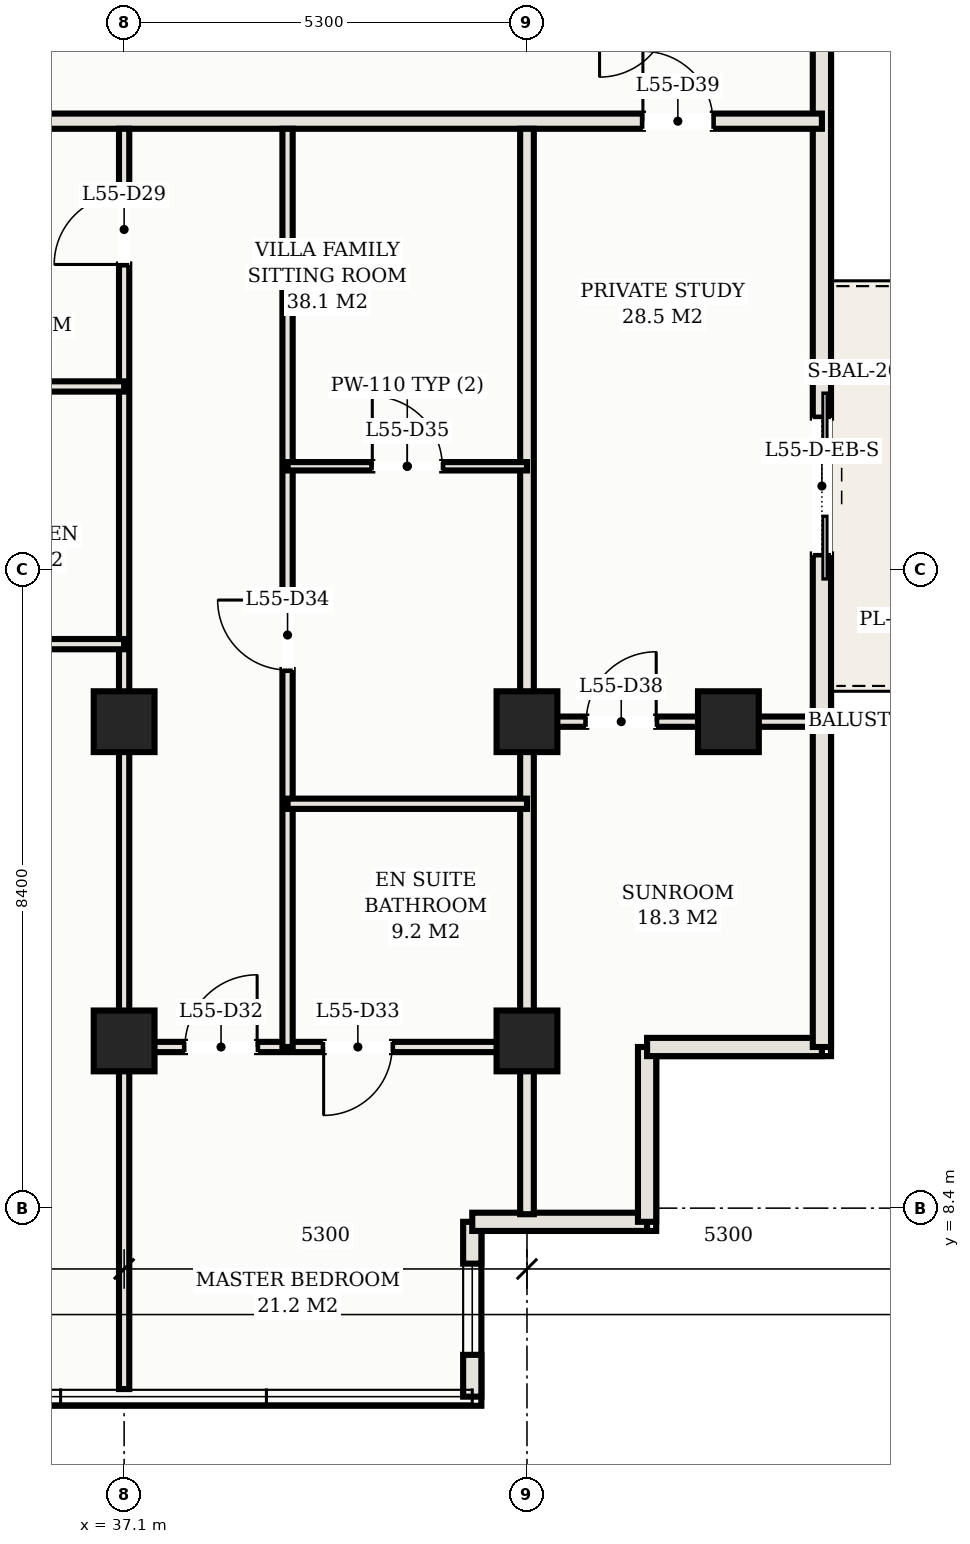
"""IFC4 building model, lengths in metres.
Left out: names, types, materials, properties, quantities, classifications, styles, units other than length and angle.
Written with IfcOpenShell. Run it as: python <this file> out.ifc"""

import sys

from ifc_helpers import new_model, si_unit, direction, frame, frame_2d, origin, origin_2d, place, context, subcontext, project, spatial, rectangle, hollow_rectangle, extrude, element, fill, save


model = new_model("IFC4")
c1 = context("Model", 3, precision=1e-05, world=origin(), true_north=direction((0.0, 1.0)))
c2 = subcontext(c1, "Body", "Model", "MODEL_VIEW")
j1 = project(units=[si_unit("LENGTHUNIT", "METRE"), si_unit("PLANEANGLEUNIT", "RADIAN")], contexts=[c1])
p1 = place(None, origin())
s1 = spatial("IfcSite", under=j1, at=p1, CompositionType="ELEMENT")
p2 = place(p1, origin())
s2 = spatial("IfcBuilding", under=s1, at=p2, CompositionType="ELEMENT")
p3 = place(p2, frame((0.0, 0.0, 203.3)))
s3 = spatial("IfcBuildingStorey", under=s2, at=p3, CompositionType="ELEMENT", Elevation=203.3)
for number, where, z_axis, x_axis in (
    (1, (37.1, 14.8, 0.0), (0.0, 0.0, 1.0), (1.0, 0.0, 0.0)),
    (2, (37.1, 10.6, 0.0), (0.0, 0.0, 1.0), (1.0, 0.0, 0.0)),
    (3, (42.4, 14.8, 0.0), (0.0, 0.0, 1.0), (1.0, 0.0, 0.0)),
    (4, (42.4, 10.6, 0.0), (0.0, 0.0, 1.0), (1.0, 0.0, 0.0)),
    (5, (45.05, 14.8, 0.0), (0.0, 0.0, 1.0), (1.0, 0.0, 0.0)),
):
    element("IfcColumn", number, at=place(p3, frame(where, z_axis=z_axis, x_axis=x_axis)), inside=s3, PredefinedType="COLUMN", context=c2, shape_type="SweptSolid", body=[
        extrude(hollow_rectangle(XDim=0.8, YDim=0.8, WallThickness=0.028, at=origin_2d()), origin(), (0.0, 0.0, 1.0), 3.3),
    ])
p4 = place(p3, frame((41.68, 5.92, 0.0), z_axis=(0.0, 0.0, 1.0), x_axis=(0.0, 1.0, 0.0)))
e6 = element("IfcWall", 6, at=p4, inside=s3, PredefinedType="SOLIDWALL", context=c2, shape_type="SweptSolid", body=[
    extrude(rectangle(XDim=2.3, YDim=0.24, at=frame_2d((1.15, 0.0))), origin(), (0.0, 0.0, 1.0), 3.11),
])
p5 = place(p4, frame((0.55, 0.0, 0.75)))
e7 = element("IfcOpeningElement", 7, at=p5, cuts=e6, PredefinedType="OPENING", context=c2, shape_type="SweptSolid", body=[
    extrude(rectangle(XDim=1.2, YDim=1.5, at=frame_2d((0.6, 0.75))), frame((0.0, 0.13, 0.0), z_axis=(0.0, -1.0, 0.0), x_axis=(1.0, 0.0, 0.0)), (0.0, 0.0, 1.0), 0.26),
])
for number, where, z_axis, x_axis in (
    (8, (41.68, 8.22, 0.0), (0.0, 0.0, 1.0), (1.0, 0.0, 0.0)),
    (9, (43.98, 8.22, 0.0), (0.0, 0.0, 1.0), (0.0, 1.0, 0.0)),
    (10, (43.98, 10.52, 0.0), (0.0, 0.0, 1.0), (1.0, 0.0, 0.0)),
):
    element("IfcWall", number, at=place(p3, frame(where, z_axis=z_axis, x_axis=x_axis)), inside=s3, PredefinedType="SOLIDWALL", context=c2, shape_type="SweptSolid", body=[
        extrude(rectangle(XDim=2.3, YDim=0.24, at=frame_2d((1.15, 0.0))), origin(), (0.0, 0.0, 1.0), 3.11),
    ])
p6 = place(p3, frame((46.28, 10.52, 0.0), z_axis=(0.0, 0.0, 1.0), x_axis=(0.0, 1.0, 0.0)))
e11 = element("IfcWall", 11, at=p6, inside=s3, PredefinedType="SOLIDWALL", context=c2, shape_type="SweptSolid", body=[
    extrude(rectangle(XDim=26.41, YDim=0.24, at=frame_2d((13.205, 0.0))), origin(), (0.0, 0.0, 1.0), 3.11),
])
p7 = place(p6, frame((6.48, 0.0, 0.0)))
e12 = element("IfcOpeningElement", 12, at=p7, cuts=e11, PredefinedType="OPENING", context=c2, shape_type="SweptSolid", body=[
    extrude(rectangle(XDim=1.8, YDim=2.2, at=frame_2d((0.9, 1.1))), frame((0.0, 0.13, 0.0), z_axis=(0.0, -1.0, 0.0), x_axis=(1.0, 0.0, 0.0)), (0.0, 0.0, 1.0), 0.26),
])
p8 = place(p3, frame((6.72, 22.7, 0.0), z_axis=(0.0, 0.0, 1.0), x_axis=(1.0, 0.0, 0.0)))
e13 = element("IfcWall", 13, at=p8, inside=s3, PredefinedType="PARTITIONING", context=c2, shape_type="SweptSolid", body=[
    extrude(rectangle(XDim=39.56, YDim=0.2, at=frame_2d((19.78, 0.0))), origin(), (0.0, 0.0, 1.0), 2.43),
])
p9 = place(p8, frame((4.63, 0.0, 0.0)))
e14 = element("IfcOpeningElement", 14, at=p9, cuts=e13, PredefinedType="OPENING", context=c2, shape_type="SweptSolid", body=[
    extrude(rectangle(XDim=1.1, YDim=2.25, at=frame_2d((0.55, 1.125))), frame((0.0, 0.11, 0.0), z_axis=(0.0, -1.0, 0.0), x_axis=(1.0, 0.0, 0.0)), (0.0, 0.0, 1.0), 0.22),
])
p10 = place(p8, frame((9.93, 0.0, 0.0)))
e15 = element("IfcOpeningElement", 15, at=p10, cuts=e13, PredefinedType="OPENING", context=c2, shape_type="SweptSolid", body=[
    extrude(rectangle(XDim=1.1, YDim=2.25, at=frame_2d((0.55, 1.125))), frame((0.0, 0.11, 0.0), z_axis=(0.0, -1.0, 0.0), x_axis=(1.0, 0.0, 0.0)), (0.0, 0.0, 1.0), 0.22),
])
p11 = place(p8, frame((25.83, 0.0, 0.0)))
e16 = element("IfcOpeningElement", 16, at=p11, cuts=e13, PredefinedType="OPENING", context=c2, shape_type="SweptSolid", body=[
    extrude(rectangle(XDim=1.1, YDim=2.25, at=frame_2d((0.55, 1.125))), frame((0.0, 0.11, 0.0), z_axis=(0.0, -1.0, 0.0), x_axis=(1.0, 0.0, 0.0)), (0.0, 0.0, 1.0), 0.22),
])
p12 = place(p8, frame((1.435, 0.0, 0.0)))
e17 = element("IfcOpeningElement", 17, at=p12, cuts=e13, PredefinedType="OPENING", context=c2, shape_type="SweptSolid", body=[
    extrude(rectangle(XDim=0.92, YDim=2.15, at=frame_2d((0.46, 1.075))), frame((0.0, 0.11, 0.0), z_axis=(0.0, -1.0, 0.0), x_axis=(1.0, 0.0, 0.0)), (0.0, 0.0, 1.0), 0.22),
])
p13 = place(p8, frame((37.205, 0.0, 0.0)))
e18 = element("IfcOpeningElement", 18, at=p13, cuts=e13, PredefinedType="OPENING", context=c2, shape_type="SweptSolid", body=[
    extrude(rectangle(XDim=0.92, YDim=2.15, at=frame_2d((0.46, 1.075))), frame((0.0, 0.11, 0.0), z_axis=(0.0, -1.0, 0.0), x_axis=(1.0, 0.0, 0.0)), (0.0, 0.0, 1.0), 0.22),
])
p14 = place(p3, frame((42.4, 8.32, 0.0), z_axis=(0.0, 0.0, 1.0), x_axis=(0.0, 1.0, 0.0)))
e19 = element("IfcWall", 19, at=p14, inside=s3, PredefinedType="PARTITIONING", context=c2, shape_type="SweptSolid", body=[
    extrude(rectangle(XDim=14.28, YDim=0.18, at=frame_2d((7.14, 0.0))), origin(), (0.0, 0.0, 1.0), 2.43),
])
p15 = place(p3, frame((37.1, 6.02, 0.0), z_axis=(0.0, 0.0, 1.0), x_axis=(0.0, 1.0, 0.0)))
e20 = element("IfcWall", 20, at=p15, inside=s3, PredefinedType="PARTITIONING", context=c2, shape_type="SweptSolid", body=[
    extrude(rectangle(XDim=16.58, YDim=0.135, at=frame_2d((8.29, 0.0))), origin(), (0.0, 0.0, 1.0), 2.43),
])
p16 = place(p15, frame((14.795, 0.0, 0.0)))
e21 = element("IfcOpeningElement", 21, at=p16, cuts=e20, PredefinedType="OPENING", context=c2, shape_type="SweptSolid", body=[
    extrude(rectangle(XDim=0.92, YDim=2.15, at=frame_2d((0.46, 1.075))), frame((0.0, 0.078, 0.0), z_axis=(0.0, -1.0, 0.0), x_axis=(1.0, 0.0, 0.0)), (0.0, 0.0, 1.0), 0.155),
])
for number, where, z_axis, x_axis in (
    (22, (33.95, 15.82, 0.0), (0.0, 0.0, 1.0), (1.0, 0.0, 0.0)),
    (23, (33.95, 19.21, 0.0), (0.0, 0.0, 1.0), (1.0, 0.0, 0.0)),
):
    element("IfcWall", number, at=place(p3, frame(where, z_axis=z_axis, x_axis=x_axis)), inside=s3, PredefinedType="PARTITIONING", context=c2, shape_type="SweptSolid", body=[
        extrude(rectangle(XDim=3.15, YDim=0.135, at=frame_2d((1.575, 0.0))), origin(), (0.0, 0.0, 1.0), 2.43),
    ])
p17 = place(p3, frame((37.1, 10.52, 0.0), z_axis=(0.0, 0.0, 1.0), x_axis=(1.0, 0.0, 0.0)))
e24 = element("IfcWall", 24, at=p17, inside=s3, PredefinedType="PARTITIONING", context=c2, shape_type="SweptSolid", body=[
    extrude(rectangle(XDim=5.3, YDim=0.135, at=frame_2d((2.65, 0.0))), origin(), (0.0, 0.0, 1.0), 2.43),
])
p18 = place(p17, frame((0.8, 0.0, 0.0)))
e25 = element("IfcOpeningElement", 25, at=p18, cuts=e24, PredefinedType="OPENING", context=c2, shape_type="SweptSolid", body=[
    extrude(rectangle(XDim=0.95, YDim=2.15, at=frame_2d((0.475, 1.075))), frame((0.0, 0.078, 0.0), z_axis=(0.0, -1.0, 0.0), x_axis=(1.0, 0.0, 0.0)), (0.0, 0.0, 1.0), 0.155),
])
p19 = place(p17, frame((2.625, 0.0, 0.0)))
e26 = element("IfcOpeningElement", 26, at=p19, cuts=e24, PredefinedType="OPENING", context=c2, shape_type="SweptSolid", body=[
    extrude(rectangle(XDim=0.9, YDim=2.15, at=frame_2d((0.45, 1.075))), frame((0.0, 0.078, 0.0), z_axis=(0.0, -1.0, 0.0), x_axis=(1.0, 0.0, 0.0)), (0.0, 0.0, 1.0), 0.155),
])
p20 = place(p3, frame((39.25, 10.52, 0.0), z_axis=(0.0, 0.0, 1.0), x_axis=(0.0, 1.0, 0.0)))
e27 = element("IfcWall", 27, at=p20, inside=s3, PredefinedType="PARTITIONING", context=c2, shape_type="SweptSolid", body=[
    extrude(rectangle(XDim=12.08, YDim=0.135, at=frame_2d((6.04, 0.0))), origin(), (0.0, 0.0, 1.0), 2.43),
])
p21 = place(p20, frame((4.96, 0.0, 0.0)))
e28 = element("IfcOpeningElement", 28, at=p21, cuts=e27, PredefinedType="OPENING", context=c2, shape_type="SweptSolid", body=[
    extrude(rectangle(XDim=0.92, YDim=2.15, at=frame_2d((0.46, 1.075))), frame((0.0, 0.078, 0.0), z_axis=(0.0, -1.0, 0.0), x_axis=(1.0, 0.0, 0.0)), (0.0, 0.0, 1.0), 0.155),
])
p22 = place(p3, frame((39.25, 13.72, 0.0), z_axis=(0.0, 0.0, 1.0), x_axis=(1.0, 0.0, 0.0)))
e29 = element("IfcWall", 29, at=p22, inside=s3, PredefinedType="PARTITIONING", context=c2, shape_type="SweptSolid", body=[
    extrude(rectangle(XDim=3.15, YDim=0.135, at=frame_2d((1.575, 0.0))), origin(), (0.0, 0.0, 1.0), 2.43),
])
p23 = place(p3, frame((39.25, 18.16, 0.0), z_axis=(0.0, 0.0, 1.0), x_axis=(1.0, 0.0, 0.0)))
e30 = element("IfcWall", 30, at=p23, inside=s3, PredefinedType="MOVABLE", context=c2, shape_type="SweptSolid", body=[
    extrude(rectangle(XDim=3.15, YDim=0.11, at=frame_2d((1.575, 0.0))), origin(), (0.0, 0.0, 1.0), 2.43),
])
p24 = place(p23, frame((1.115, 0.0, 0.0)))
e31 = element("IfcOpeningElement", 31, at=p24, cuts=e30, PredefinedType="OPENING", context=c2, shape_type="SweptSolid", body=[
    extrude(rectangle(XDim=0.92, YDim=2.15, at=frame_2d((0.46, 1.075))), frame((0.0, 0.065, 0.0), z_axis=(0.0, -1.0, 0.0), x_axis=(1.0, 0.0, 0.0)), (0.0, 0.0, 1.0), 0.13),
])
p25 = place(p3, frame((42.4, 14.8, 0.0), z_axis=(0.0, 0.0, 1.0), x_axis=(1.0, 0.0, 0.0)))
e32 = element("IfcWall", 32, at=p25, inside=s3, PredefinedType="PARTITIONING", context=c2, shape_type="SweptSolid", body=[
    extrude(rectangle(XDim=3.78, YDim=0.135, at=frame_2d((1.89, 0.0))), origin(), (0.0, 0.0, 1.0), 2.43),
])
p26 = place(p25, frame((0.78, 0.0, 0.0)))
e33 = element("IfcOpeningElement", 33, at=p26, cuts=e32, PredefinedType="OPENING", context=c2, shape_type="SweptSolid", body=[
    extrude(rectangle(XDim=0.92, YDim=2.15, at=frame_2d((0.46, 1.075))), frame((0.0, 0.078, 0.0), z_axis=(0.0, -1.0, 0.0), x_axis=(1.0, 0.0, 0.0)), (0.0, 0.0, 1.0), 0.155),
])
p27 = place(p5, origin())
e34 = element("IfcWindow", 34, at=p27, inside=s3, PartitioningType="SINGLE_PANEL", PredefinedType="WINDOW", context=c2, shape_type="SweptSolid", body=[
    extrude(rectangle(XDim=1.2, YDim=1.5, at=frame_2d((0.6, 0.75))), frame((0.0, 0.03, 0.0), z_axis=(0.0, -1.0, 0.0), x_axis=(1.0, 0.0, 0.0)), (0.0, 0.0, 1.0), 0.06),
])
fill(e7, e34)
p28 = place(p7, frame((1.8, 0.0, 0.0), z_axis=(0.0, 0.0, 1.0), x_axis=(-1.0, 0.0, 0.0)))
e35 = element("IfcDoor", 35, at=p28, inside=s3, OperationType="DOUBLE_DOOR_SLIDING", PredefinedType="DOOR", context=c2, shape_type="SweptSolid", body=[
    extrude(rectangle(XDim=1.8, YDim=2.2, at=frame_2d((0.9, 1.1))), frame((0.0, 0.025, 0.0), z_axis=(0.0, -1.0, 0.0), x_axis=(1.0, 0.0, 0.0)), (0.0, 0.0, 1.0), 0.05),
])
fill(e12, e35)
p29 = place(p16, origin())
e36 = element("IfcDoor", 36, at=p29, inside=s3, OperationType="SINGLE_SWING_LEFT", PredefinedType="DOOR", context=c2, shape_type="SweptSolid", body=[
    extrude(rectangle(XDim=0.92, YDim=2.15, at=frame_2d((0.46, 1.075))), frame((0.0, 0.025, 0.0), z_axis=(0.0, -1.0, 0.0), x_axis=(1.0, 0.0, 0.0)), (0.0, 0.0, 1.0), 0.05),
])
fill(e21, e36)
p30 = place(p18, origin())
e37 = element("IfcDoor", 37, at=p30, inside=s3, OperationType="SINGLE_SWING_RIGHT", PredefinedType="DOOR", context=c2, shape_type="SweptSolid", body=[
    extrude(rectangle(XDim=0.95, YDim=2.15, at=frame_2d((0.475, 1.075))), frame((0.0, 0.025, 0.0), z_axis=(0.0, -1.0, 0.0), x_axis=(1.0, 0.0, 0.0)), (0.0, 0.0, 1.0), 0.05),
])
fill(e25, e37)
p31 = place(p19, frame((0.9, 0.0, 0.0), z_axis=(0.0, 0.0, 1.0), x_axis=(-1.0, 0.0, 0.0)))
e38 = element("IfcDoor", 38, at=p31, inside=s3, OperationType="SINGLE_SWING_RIGHT", PredefinedType="DOOR", context=c2, shape_type="SweptSolid", body=[
    extrude(rectangle(XDim=0.9, YDim=2.15, at=frame_2d((0.45, 1.075))), frame((0.0, 0.025, 0.0), z_axis=(0.0, -1.0, 0.0), x_axis=(1.0, 0.0, 0.0)), (0.0, 0.0, 1.0), 0.05),
])
fill(e26, e38)
p32 = place(p21, origin())
e39 = element("IfcDoor", 39, at=p32, inside=s3, OperationType="SINGLE_SWING_RIGHT", PredefinedType="DOOR", context=c2, shape_type="SweptSolid", body=[
    extrude(rectangle(XDim=0.92, YDim=2.15, at=frame_2d((0.46, 1.075))), frame((0.0, 0.025, 0.0), z_axis=(0.0, -1.0, 0.0), x_axis=(1.0, 0.0, 0.0)), (0.0, 0.0, 1.0), 0.05),
])
fill(e28, e39)
p33 = place(p24, origin())
e40 = element("IfcDoor", 40, at=p33, inside=s3, OperationType="SINGLE_SWING_LEFT", PredefinedType="DOOR", context=c2, shape_type="SweptSolid", body=[
    extrude(rectangle(XDim=0.92, YDim=2.15, at=frame_2d((0.46, 1.075))), frame((0.0, 0.025, 0.0), z_axis=(0.0, -1.0, 0.0), x_axis=(1.0, 0.0, 0.0)), (0.0, 0.0, 1.0), 0.05),
])
fill(e31, e40)
p34 = place(p26, origin())
e41 = element("IfcDoor", 41, at=p34, inside=s3, OperationType="SINGLE_SWING_RIGHT", PredefinedType="DOOR", context=c2, shape_type="SweptSolid", body=[
    extrude(rectangle(XDim=0.92, YDim=2.15, at=frame_2d((0.46, 1.075))), frame((0.0, 0.025, 0.0), z_axis=(0.0, -1.0, 0.0), x_axis=(1.0, 0.0, 0.0)), (0.0, 0.0, 1.0), 0.05),
])
fill(e33, e41)
p35 = place(p13, origin())
e42 = element("IfcDoor", 42, at=p35, inside=s3, OperationType="SINGLE_SWING_LEFT", PredefinedType="DOOR", context=c2, shape_type="SweptSolid", body=[
    extrude(rectangle(XDim=0.92, YDim=2.15, at=frame_2d((0.46, 1.075))), frame((0.0, 0.025, 0.0), z_axis=(0.0, -1.0, 0.0), x_axis=(1.0, 0.0, 0.0)), (0.0, 0.0, 1.0), 0.05),
])
fill(e18, e42)
save(model, sys.argv[1])
